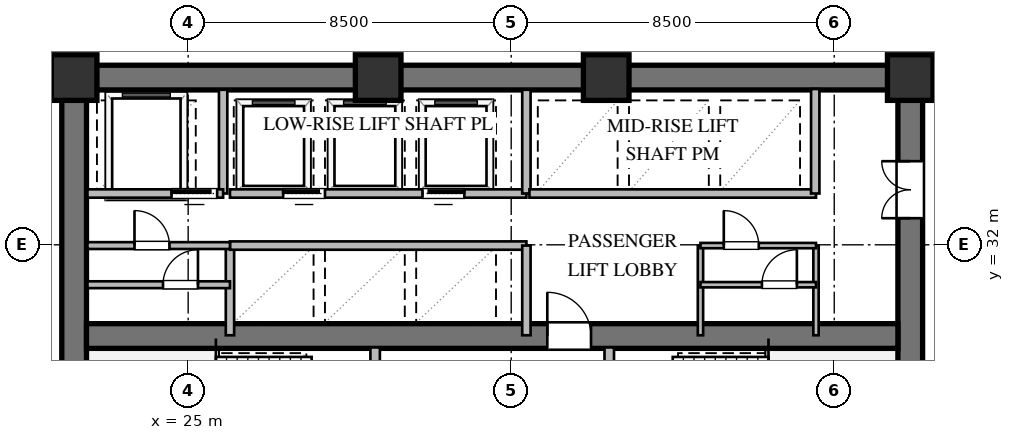
"""IFC4 building model, lengths in metres.
Left out: names, types, materials, properties, quantities, classifications, styles, units other than length and angle.
Written with IfcOpenShell. Run it as: python <this file> out.ifc"""

import sys

from ifc_helpers import new_model, si_unit, direction, frame, frame_2d, origin, origin_2d, place, context, subcontext, project, spatial, rectangle, extrude, element, fill, save


model = new_model("IFC4")
c1 = context("Model", 3, precision=1e-05, world=origin(), true_north=direction((0.0, 1.0)))
c2 = subcontext(c1, "Body", "Model", "MODEL_VIEW")
j1 = project(units=[si_unit("LENGTHUNIT", "METRE"), si_unit("PLANEANGLEUNIT", "RADIAN")], contexts=[c1])
p1 = place(None, origin())
s1 = spatial("IfcSite", under=j1, at=p1, CompositionType="ELEMENT")
p2 = place(p1, origin())
s2 = spatial("IfcBuilding", under=s1, at=p2, CompositionType="ELEMENT")
p3 = place(p2, frame((0.0, 0.0, 63.6)))
s3 = spatial("IfcBuildingStorey", under=s2, at=p3, CompositionType="ELEMENT", Elevation=63.6)
p4 = place(p3, frame((21.675, 36.4, 0.0), z_axis=(0.0, 0.0, 1.0), x_axis=(1.0, 0.0, 0.0)))
e1 = element("IfcWall", 1, at=p4, inside=s3, PredefinedType="SHEAR", context=c2, shape_type="SweptSolid", body=[
    extrude(rectangle(XDim=22.65, YDim=0.65, at=frame_2d((11.325, 0.0))), origin(), (0.0, 0.0, 1.0), 3.36),
])
p5 = place(p3, frame((22.0, 23.925, 0.0), z_axis=(0.0, 0.0, 1.0), x_axis=(0.0, 1.0, 0.0)))
e2 = element("IfcWall", 2, at=p5, inside=s3, PredefinedType="SHEAR", context=c2, shape_type="SweptSolid", body=[
    extrude(rectangle(XDim=12.15, YDim=0.65, at=frame_2d((6.075, 0.0))), origin(), (0.0, 0.0, 1.0), 3.36),
])
p6 = place(p3, frame((44.0, 23.925, 0.0), z_axis=(0.0, 0.0, 1.0), x_axis=(0.0, 1.0, 0.0)))
e3 = element("IfcWall", 3, at=p6, inside=s3, PredefinedType="SHEAR", context=c2, shape_type="SweptSolid", body=[
    extrude(rectangle(XDim=12.15, YDim=0.65, at=frame_2d((6.075, 0.0))), origin(), (0.0, 0.0, 1.0), 3.36),
])
p7 = place(p6, frame((8.775, 0.0, 0.0)))
e4 = element("IfcOpeningElement", 4, at=p7, cuts=e3, PredefinedType="OPENING", context=c2, shape_type="SweptSolid", body=[
    extrude(rectangle(XDim=1.5, YDim=2.15, at=frame_2d((0.75, 1.075))), frame((0.0, 0.335, 0.0), z_axis=(0.0, -1.0, 0.0), x_axis=(1.0, 0.0, 0.0)), (0.0, 0.0, 1.0), 0.67),
])
p8 = place(p3, frame((22.325, 29.6, 0.0), z_axis=(0.0, 0.0, 1.0), x_axis=(1.0, 0.0, 0.0)))
e5 = element("IfcWall", 5, at=p8, inside=s3, PredefinedType="SHEAR", context=c2, shape_type="SweptSolid", body=[
    extrude(rectangle(XDim=21.35, YDim=0.65, at=frame_2d((10.675, 0.0))), origin(), (0.0, 0.0, 1.0), 3.36),
])
p9 = place(p8, frame((12.125, 0.0, 0.0)))
e6 = element("IfcOpeningElement", 6, at=p9, cuts=e5, PredefinedType="OPENING", context=c2, shape_type="SweptSolid", body=[
    extrude(rectangle(XDim=1.15, YDim=2.1, at=frame_2d((0.575, 1.05))), frame((0.0, 0.335, 0.0), z_axis=(0.0, -1.0, 0.0), x_axis=(1.0, 0.0, 0.0)), (0.0, 0.0, 1.0), 0.67),
])
for number, where, z_axis, x_axis in (
    (7, (44.0, 36.4, 0.0), (0.0, 0.0, 1.0), (1.0, 0.0, 0.0)),
    (8, (36.0, 36.4, 0.0), (0.0, 0.0, 1.0), (1.0, 0.0, 0.0)),
    (9, (30.0, 36.4, 0.0), (0.0, 0.0, 1.0), (1.0, 0.0, 0.0)),
    (10, (22.0, 36.4, 0.0), (0.0, 0.0, 1.0), (1.0, 0.0, 0.0)),
):
    element("IfcColumn", number, at=place(p3, frame(where, z_axis=z_axis, x_axis=x_axis)), inside=s3, PredefinedType="COLUMN", context=c2, shape_type="SweptSolid", body=[
        extrude(rectangle(XDim=1.2, YDim=1.2, at=origin_2d()), origin(), (0.0, 0.0, 1.0), 3.6),
    ])
p10 = place(p3, frame((29.92, 23.9, 0.0), z_axis=(0.0, 0.0, 1.0), x_axis=(0.0, 1.0, 0.0)))
e11 = element("IfcWall", 11, at=p10, inside=s3, PredefinedType="SOLIDWALL", context=c2, shape_type="SweptSolid", body=[
    extrude(rectangle(XDim=5.4, YDim=0.25, at=frame_2d((2.7, 0.0))), origin(), (0.0, 0.0, 1.0), 3.36),
])
p11 = place(p10, frame((3.421, 0.0, 0.0)))
e12 = element("IfcOpeningElement", 12, at=p11, cuts=e11, PredefinedType="OPENING", context=c2, shape_type="SweptSolid", body=[
    extrude(rectangle(XDim=1.15, YDim=2.1, at=frame_2d((0.575, 1.05))), frame((0.0, 0.135, 0.0), z_axis=(0.0, -1.0, 0.0), x_axis=(1.0, 0.0, 0.0)), (0.0, 0.0, 1.0), 0.27),
])
p12 = place(p3, frame((36.08, 23.9, 0.0), z_axis=(0.0, 0.0, 1.0), x_axis=(0.0, 1.0, 0.0)))
e13 = element("IfcWall", 13, at=p12, inside=s3, PredefinedType="SOLIDWALL", context=c2, shape_type="SweptSolid", body=[
    extrude(rectangle(XDim=5.4, YDim=0.25, at=frame_2d((2.7, 0.0))), origin(), (0.0, 0.0, 1.0), 3.36),
])
p13 = place(p12, frame((3.421, 0.0, 0.0)))
e14 = element("IfcOpeningElement", 14, at=p13, cuts=e13, PredefinedType="OPENING", context=c2, shape_type="SweptSolid", body=[
    extrude(rectangle(XDim=1.15, YDim=2.1, at=frame_2d((0.575, 1.05))), frame((0.0, 0.135, 0.0), z_axis=(0.0, -1.0, 0.0), x_axis=(1.0, 0.0, 0.0)), (0.0, 0.0, 1.0), 0.27),
])
p14 = place(p3, frame((25.92, 33.35, 0.0), z_axis=(0.0, 0.0, 1.0), x_axis=(0.0, 1.0, 0.0)))
e15 = element("IfcWall", 15, at=p14, inside=s3, PredefinedType="SOLIDWALL", context=c2, shape_type="SweptSolid", body=[
    extrude(rectangle(XDim=2.73, YDim=0.22, at=frame_2d((1.365, 0.0))), origin(), (0.0, 0.0, 1.0), 3.36),
])
p15 = place(p3, frame((22.35, 33.35, 0.0), z_axis=(0.0, 0.0, 1.0), x_axis=(1.0, 0.0, 0.0)))
e16 = element("IfcWall", 16, at=p15, inside=s3, PredefinedType="SOLIDWALL", context=c2, shape_type="SweptSolid", body=[
    extrude(rectangle(XDim=3.57, YDim=0.22, at=frame_2d((1.785, 0.0))), origin(), (0.0, 0.0, 1.0), 3.36),
])
p16 = place(p15, frame((2.213, 0.0, 0.0)))
e17 = element("IfcOpeningElement", 17, at=p16, cuts=e16, PredefinedType="OPENING", context=c2, shape_type="SweptSolid", body=[
    extrude(rectangle(XDim=1.2, YDim=2.1, at=frame_2d((0.6, 1.05))), frame((0.0, 0.12, 0.0), z_axis=(0.0, -1.0, 0.0), x_axis=(1.0, 0.0, 0.0)), (0.0, 0.0, 1.0), 0.24),
])
p17 = place(p3, frame((26.1, 29.62, 0.0), z_axis=(0.0, 0.0, 1.0), x_axis=(0.0, 1.0, 0.0)))
e18 = element("IfcWall", 18, at=p17, inside=s3, PredefinedType="SOLIDWALL", context=c2, shape_type="SweptSolid", body=[
    extrude(rectangle(XDim=2.36, YDim=0.22, at=frame_2d((1.18, 0.0))), origin(), (0.0, 0.0, 1.0), 3.36),
])
p18 = place(p3, frame((26.1, 31.98, 0.0), z_axis=(0.0, 0.0, 1.0), x_axis=(1.0, 0.0, 0.0)))
e19 = element("IfcWall", 19, at=p18, inside=s3, PredefinedType="SOLIDWALL", context=c2, shape_type="SweptSolid", body=[
    extrude(rectangle(XDim=7.8, YDim=0.22, at=frame_2d((3.9, 0.0))), origin(), (0.0, 0.0, 1.0), 3.36),
])
p19 = place(p3, frame((33.9, 29.62, 0.0), z_axis=(0.0, 0.0, 1.0), x_axis=(0.0, 1.0, 0.0)))
e20 = element("IfcWall", 20, at=p19, inside=s3, PredefinedType="SOLIDWALL", context=c2, shape_type="SweptSolid", body=[
    extrude(rectangle(XDim=2.36, YDim=0.22, at=frame_2d((1.18, 0.0))), origin(), (0.0, 0.0, 1.0), 3.36),
])
p20 = place(p3, frame((26.1, 33.35, 0.0), z_axis=(0.0, 0.0, 1.0), x_axis=(1.0, 0.0, 0.0)))
e21 = element("IfcWall", 21, at=p20, inside=s3, PredefinedType="SOLIDWALL", context=c2, shape_type="SweptSolid", body=[
    extrude(rectangle(XDim=7.8, YDim=0.22, at=frame_2d((3.9, 0.0))), origin(), (0.0, 0.0, 1.0), 3.36),
])
p21 = place(p20, frame((1.4, 0.0, 0.0)))
e22 = element("IfcOpeningElement", 22, at=p21, cuts=e21, PredefinedType="OPENING", context=c2, shape_type="SweptSolid", body=[
    extrude(rectangle(XDim=1.1, YDim=2.1, at=frame_2d((0.55, 1.05))), frame((0.0, 0.12, 0.0), z_axis=(0.0, -1.0, 0.0), x_axis=(1.0, 0.0, 0.0)), (0.0, 0.0, 1.0), 0.24),
])
p22 = place(p20, frame((5.066, 0.0, 0.0)))
e23 = element("IfcOpeningElement", 23, at=p22, cuts=e21, PredefinedType="OPENING", context=c2, shape_type="SweptSolid", body=[
    extrude(rectangle(XDim=1.1, YDim=2.1, at=frame_2d((0.55, 1.05))), frame((0.0, 0.12, 0.0), z_axis=(0.0, -1.0, 0.0), x_axis=(1.0, 0.0, 0.0)), (0.0, 0.0, 1.0), 0.24),
])
p23 = place(p3, frame((33.9, 33.35, 0.0), z_axis=(0.0, 0.0, 1.0), x_axis=(0.0, 1.0, 0.0)))
e24 = element("IfcWall", 24, at=p23, inside=s3, PredefinedType="SOLIDWALL", context=c2, shape_type="SweptSolid", body=[
    extrude(rectangle(XDim=2.73, YDim=0.22, at=frame_2d((1.365, 0.0))), origin(), (0.0, 0.0, 1.0), 3.36),
])
p24 = place(p3, frame((33.98, 33.35, 0.0), z_axis=(0.0, 0.0, 1.0), x_axis=(1.0, 0.0, 0.0)))
e25 = element("IfcWall", 25, at=p24, inside=s3, PredefinedType="SOLIDWALL", context=c2, shape_type="SweptSolid", body=[
    extrude(rectangle(XDim=7.54, YDim=0.22, at=frame_2d((3.77, 0.0))), origin(), (0.0, 0.0, 1.0), 3.36),
])
p25 = place(p3, frame((41.5, 33.35, 0.0), z_axis=(0.0, 0.0, 1.0), x_axis=(0.0, 1.0, 0.0)))
e26 = element("IfcWall", 26, at=p25, inside=s3, PredefinedType="SOLIDWALL", context=c2, shape_type="SweptSolid", body=[
    extrude(rectangle(XDim=2.75, YDim=0.22, at=frame_2d((1.375, 0.0))), origin(), (0.0, 0.0, 1.0), 3.36),
])
p26 = place(p3, frame((22.35, 30.95, 0.0), z_axis=(0.0, 0.0, 1.0), x_axis=(1.0, 0.0, 0.0)))
e27 = element("IfcWall", 27, at=p26, inside=s3, PredefinedType="PARTITIONING", context=c2, shape_type="SweptSolid", body=[
    extrude(rectangle(XDim=3.75, YDim=0.18, at=frame_2d((1.875, 0.0))), origin(), (0.0, 0.0, 1.0), 3.36),
])
p27 = place(p26, frame((1.988, 0.0, 0.0)))
e28 = element("IfcOpeningElement", 28, at=p27, cuts=e27, PredefinedType="OPENING", context=c2, shape_type="SweptSolid", body=[
    extrude(rectangle(XDim=0.92, YDim=2.1, at=frame_2d((0.46, 1.05))), frame((0.0, 0.1, 0.0), z_axis=(0.0, -1.0, 0.0), x_axis=(1.0, 0.0, 0.0)), (0.0, 0.0, 1.0), 0.2),
])
p28 = place(p3, frame((22.35, 31.98, 0.0), z_axis=(0.0, 0.0, 1.0), x_axis=(1.0, 0.0, 0.0)))
e29 = element("IfcWall", 29, at=p28, inside=s3, PredefinedType="PARTITIONING", context=c2, shape_type="SweptSolid", body=[
    extrude(rectangle(XDim=3.75, YDim=0.18, at=frame_2d((1.875, 0.0))), origin(), (0.0, 0.0, 1.0), 3.36),
])
p29 = place(p28, frame((1.238, 0.0, 0.0)))
e30 = element("IfcOpeningElement", 30, at=p29, cuts=e29, PredefinedType="OPENING", context=c2, shape_type="SweptSolid", body=[
    extrude(rectangle(XDim=0.92, YDim=2.1, at=frame_2d((0.46, 1.05))), frame((0.0, 0.1, 0.0), z_axis=(0.0, -1.0, 0.0), x_axis=(1.0, 0.0, 0.0)), (0.0, 0.0, 1.0), 0.2),
])
for number, where, z_axis, x_axis in (
    (31, (38.48, 29.62, 0.0), (0.0, 0.0, 1.0), (0.0, 1.0, 0.0)),
    (32, (41.52, 29.62, 0.0), (0.0, 0.0, 1.0), (0.0, 1.0, 0.0)),
):
    element("IfcWall", number, at=place(p3, frame(where, z_axis=z_axis, x_axis=x_axis)), inside=s3, PredefinedType="PARTITIONING", context=c2, shape_type="SweptSolid", body=[
        extrude(rectangle(XDim=2.36, YDim=0.14, at=frame_2d((1.18, 0.0))), origin(), (0.0, 0.0, 1.0), 3.36),
    ])
p30 = place(p3, frame((38.48, 30.95, 0.0), z_axis=(0.0, 0.0, 1.0), x_axis=(1.0, 0.0, 0.0)))
e33 = element("IfcWall", 33, at=p30, inside=s3, PredefinedType="PARTITIONING", context=c2, shape_type="SweptSolid", body=[
    extrude(rectangle(XDim=3.04, YDim=0.14, at=frame_2d((1.52, 0.0))), origin(), (0.0, 0.0, 1.0), 3.36),
])
p31 = place(p30, frame((1.617, 0.0, 0.0)))
e34 = element("IfcOpeningElement", 34, at=p31, cuts=e33, PredefinedType="OPENING", context=c2, shape_type="SweptSolid", body=[
    extrude(rectangle(XDim=0.92, YDim=2.1, at=frame_2d((0.46, 1.05))), frame((0.0, 0.08, 0.0), z_axis=(0.0, -1.0, 0.0), x_axis=(1.0, 0.0, 0.0)), (0.0, 0.0, 1.0), 0.16),
])
p32 = place(p3, frame((38.48, 31.98, 0.0), z_axis=(0.0, 0.0, 1.0), x_axis=(1.0, 0.0, 0.0)))
e35 = element("IfcWall", 35, at=p32, inside=s3, PredefinedType="PARTITIONING", context=c2, shape_type="SweptSolid", body=[
    extrude(rectangle(XDim=3.04, YDim=0.14, at=frame_2d((1.52, 0.0))), origin(), (0.0, 0.0, 1.0), 3.36),
])
p33 = place(p32, frame((0.614, 0.0, 0.0)))
e36 = element("IfcOpeningElement", 36, at=p33, cuts=e35, PredefinedType="OPENING", context=c2, shape_type="SweptSolid", body=[
    extrude(rectangle(XDim=0.92, YDim=2.1, at=frame_2d((0.46, 1.05))), frame((0.0, 0.08, 0.0), z_axis=(0.0, -1.0, 0.0), x_axis=(1.0, 0.0, 0.0)), (0.0, 0.0, 1.0), 0.16),
])
p34 = place(p9, origin())
e37 = element("IfcDoor", 37, at=p34, inside=s3, OperationType="SINGLE_SWING_LEFT", PredefinedType="DOOR", context=c2, shape_type="SweptSolid", body=[
    extrude(rectangle(XDim=1.15, YDim=2.1, at=frame_2d((0.575, 1.05))), frame((0.0, 0.025, 0.0), z_axis=(0.0, -1.0, 0.0), x_axis=(1.0, 0.0, 0.0)), (0.0, 0.0, 1.0), 0.05),
])
fill(e6, e37)
p35 = place(p7, origin())
e38 = element("IfcDoor", 38, at=p35, inside=s3, OperationType="DOUBLE_DOOR_SINGLE_SWING", PredefinedType="DOOR", context=c2, shape_type="SweptSolid", body=[
    extrude(rectangle(XDim=1.5, YDim=2.15, at=frame_2d((0.75, 1.075))), frame((0.0, 0.025, 0.0), z_axis=(0.0, -1.0, 0.0), x_axis=(1.0, 0.0, 0.0)), (0.0, 0.0, 1.0), 0.05),
])
fill(e4, e38)
p36 = place(p16, origin())
e39 = element("IfcDoor", 39, at=p36, inside=s3, OperationType="SLIDING_TO_LEFT", PredefinedType="DOOR", context=c2, shape_type="SweptSolid", body=[
    extrude(rectangle(XDim=1.2, YDim=2.1, at=frame_2d((0.6, 1.05))), frame((0.0, 0.025, 0.0), z_axis=(0.0, -1.0, 0.0), x_axis=(1.0, 0.0, 0.0)), (0.0, 0.0, 1.0), 0.05),
])
fill(e17, e39)
p37 = place(p21, origin())
e40 = element("IfcDoor", 40, at=p37, inside=s3, OperationType="SLIDING_TO_LEFT", PredefinedType="DOOR", context=c2, shape_type="SweptSolid", body=[
    extrude(rectangle(XDim=1.1, YDim=2.1, at=frame_2d((0.55, 1.05))), frame((0.0, 0.025, 0.0), z_axis=(0.0, -1.0, 0.0), x_axis=(1.0, 0.0, 0.0)), (0.0, 0.0, 1.0), 0.05),
])
fill(e22, e40)
p38 = place(p22, origin())
e41 = element("IfcDoor", 41, at=p38, inside=s3, OperationType="SLIDING_TO_RIGHT", PredefinedType="DOOR", context=c2, shape_type="SweptSolid", body=[
    extrude(rectangle(XDim=1.1, YDim=2.1, at=frame_2d((0.55, 1.05))), frame((0.0, 0.025, 0.0), z_axis=(0.0, -1.0, 0.0), x_axis=(1.0, 0.0, 0.0)), (0.0, 0.0, 1.0), 0.05),
])
fill(e23, e41)
p39 = place(p29, origin())
e42 = element("IfcDoor", 42, at=p39, inside=s3, OperationType="SINGLE_SWING_LEFT", PredefinedType="DOOR", context=c2, shape_type="SweptSolid", body=[
    extrude(rectangle(XDim=0.92, YDim=2.1, at=frame_2d((0.46, 1.05))), frame((0.0, 0.025, 0.0), z_axis=(0.0, -1.0, 0.0), x_axis=(1.0, 0.0, 0.0)), (0.0, 0.0, 1.0), 0.05),
])
fill(e30, e42)
p40 = place(p27, origin())
e43 = element("IfcDoor", 43, at=p40, inside=s3, OperationType="SINGLE_SWING_RIGHT", PredefinedType="DOOR", context=c2, shape_type="SweptSolid", body=[
    extrude(rectangle(XDim=0.92, YDim=2.1, at=frame_2d((0.46, 1.05))), frame((0.0, 0.025, 0.0), z_axis=(0.0, -1.0, 0.0), x_axis=(1.0, 0.0, 0.0)), (0.0, 0.0, 1.0), 0.05),
])
fill(e28, e43)
p41 = place(p33, origin())
e44 = element("IfcDoor", 44, at=p41, inside=s3, OperationType="SINGLE_SWING_LEFT", PredefinedType="DOOR", context=c2, shape_type="SweptSolid", body=[
    extrude(rectangle(XDim=0.92, YDim=2.1, at=frame_2d((0.46, 1.05))), frame((0.0, 0.025, 0.0), z_axis=(0.0, -1.0, 0.0), x_axis=(1.0, 0.0, 0.0)), (0.0, 0.0, 1.0), 0.05),
])
fill(e36, e44)
p42 = place(p31, origin())
e45 = element("IfcDoor", 45, at=p42, inside=s3, OperationType="SINGLE_SWING_RIGHT", PredefinedType="DOOR", context=c2, shape_type="SweptSolid", body=[
    extrude(rectangle(XDim=0.92, YDim=2.1, at=frame_2d((0.46, 1.05))), frame((0.0, 0.025, 0.0), z_axis=(0.0, -1.0, 0.0), x_axis=(1.0, 0.0, 0.0)), (0.0, 0.0, 1.0), 0.05),
])
fill(e34, e45)
save(model, sys.argv[1])
